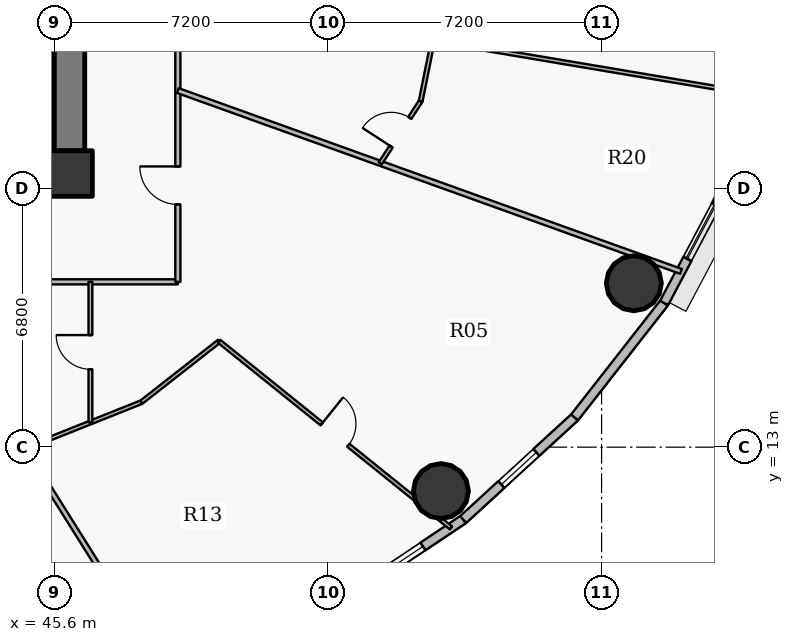
"""IFC4 building model, lengths in metres.
Left out: names, types, materials, properties, quantities, classifications, styles, units other than length and angle.
Written with IfcOpenShell. Run it as: python <this file> out.ifc"""

import sys

from ifc_helpers import new_model, si_unit, direction, frame, frame_2d, origin, origin_2d, place, context, subcontext, project, spatial, rectangle, hollow_circle, extrude, source, transform, mapped, element, fill, save


model = new_model("IFC4")
c1 = context("Model", 3, precision=1e-05, world=origin(), true_north=direction((0.0, 1.0)))
c2 = subcontext(c1, "Body", "Model", "MODEL_VIEW")
j1 = project(units=[si_unit("LENGTHUNIT", "METRE"), si_unit("PLANEANGLEUNIT", "RADIAN")], contexts=[c1])
p1 = place(None, origin())
s1 = spatial("IfcSite", under=j1, at=p1, CompositionType="ELEMENT")
p2 = place(p1, origin())
s2 = spatial("IfcBuilding", under=s1, at=p2, CompositionType="ELEMENT")
p3 = place(p2, frame((0.0, 0.0, 123.45)))
s3 = spatial("IfcBuildingStorey", under=s2, at=p3, CompositionType="ELEMENT", Elevation=123.45)
p4 = place(p3, frame((46.0, 20.2, 0.0), z_axis=(0.0, 0.0, 1.0), x_axis=(1.0, 0.0, 0.0)))
e1 = element("IfcColumn", 1, at=p4, inside=s3, PredefinedType="COLUMN", context=c2, shape_type="SweptSolid", body=[
    extrude(rectangle(XDim=1.2, YDim=1.2, at=origin_2d()), origin(), (0.0, 0.0, 1.0), 3.75),
])
p5 = place(p3, frame((46.0, 33.2, 0.0), z_axis=(0.0, 0.0, 1.0), x_axis=(0.0, -1.0, 0.0)))
e2 = element("IfcWall", 2, at=p5, inside=s3, PredefinedType="SHEAR", context=c2, shape_type="SweptSolid", body=[
    extrude(rectangle(XDim=12.4, YDim=0.8, at=frame_2d((6.2, 0.0))), origin(), (0.0, 0.0, 1.0), 2.95),
])
p6 = place(p5, frame((5.79, 0.0, 0.0)))
e3 = element("IfcOpeningElement", 3, at=p6, cuts=e2, PredefinedType="OPENING", context=c2, shape_type="SweptSolid", body=[
    extrude(rectangle(XDim=0.82, YDim=2.1, at=origin_2d()), frame((0.41, 0.41, 1.05), z_axis=(0.0, -1.0, 0.0), x_axis=(1.0, 0.0, 0.0)), (0.0, 0.0, 1.0), 0.82),
])
for number, where, z_axis, x_axis in (
    (4, (55.773, 11.844, 0.0), (0.0, 0.0, 1.0), (1.0, 0.0, 0.0)),
    (5, (60.849, 17.312, 0.0), (0.0, 0.0, 1.0), (1.0, 0.0, 0.0)),
):
    element("IfcColumn", number, at=place(p3, frame(where, z_axis=z_axis, x_axis=x_axis)), inside=s3, PredefinedType="COLUMN", context=c2, shape_type="SweptSolid", body=[
        extrude(hollow_circle(Radius=0.725, WallThickness=0.042, at=origin_2d()), origin(), (0.0, 0.0, 1.0), 3.75),
    ])
p7 = place(p3, frame((56.358, 11.097, 0.0), z_axis=(0.0, 0.0, 1.0), x_axis=(-0.831221811447, -0.555940914284, 0.0)))
e6 = element("IfcWall", 6, at=p7, inside=s3, PredefinedType="SOLIDWALL", context=c2, shape_type="SweptSolid", body=[
    extrude(rectangle(XDim=4.13, YDim=0.24, at=frame_2d((2.065, 0.0))), origin(), (0.0, 0.0, 1.0), 3.5),
])
p8 = place(p7, frame((1.276, 0.0, 0.9)))
e7 = element("IfcOpeningElement", 7, at=p8, cuts=e6, PredefinedType="OPENING", context=c2, shape_type="SweptSolid", body=[
    extrude(rectangle(XDim=2.0, YDim=1.75, at=origin_2d()), frame((1.0, 0.13, 0.875), z_axis=(0.0, -1.0, 0.0), x_axis=(1.0, 0.0, 0.0)), (0.0, 0.0, 1.0), 0.26),
])
p9 = place(p3, frame((59.289, 13.783, 0.0), z_axis=(0.0, 0.0, 1.0), x_axis=(-0.737113356241, -0.675769117414, 0.0)))
e8 = element("IfcWall", 8, at=p9, inside=s3, PredefinedType="SOLIDWALL", context=c2, shape_type="SweptSolid", body=[
    extrude(rectangle(XDim=3.976, YDim=0.24, at=frame_2d((1.988, 0.0))), origin(), (0.0, 0.0, 1.0), 3.5),
])
p10 = place(p9, frame((1.363, 0.0, 0.9)))
e9 = element("IfcOpeningElement", 9, at=p10, cuts=e8, PredefinedType="OPENING", context=c2, shape_type="SweptSolid", body=[
    extrude(rectangle(XDim=1.25, YDim=1.65, at=origin_2d()), frame((0.625, 0.13, 0.825), z_axis=(0.0, -1.0, 0.0), x_axis=(1.0, 0.0, 0.0)), (0.0, 0.0, 1.0), 0.26),
])
p11 = place(p3, frame((61.645, 16.794, 0.0), z_axis=(0.0, 0.0, 1.0), x_axis=(-0.616272103517, -0.787533297345, 0.0)))
e10 = element("IfcWall", 10, at=p11, inside=s3, PredefinedType="SOLIDWALL", context=c2, shape_type="SweptSolid", body=[
    extrude(rectangle(XDim=3.823, YDim=0.24, at=frame_2d((1.912, 0.0))), origin(), (0.0, 0.0, 1.0), 3.5),
])
p12 = place(p3, frame((63.37, 20.055, 0.0), z_axis=(0.0, 0.0, 1.0), x_axis=(-0.467614004126, -0.883932770716, 0.0)))
e11 = element("IfcWall", 11, at=p12, inside=s3, PredefinedType="SOLIDWALL", context=c2, shape_type="SweptSolid", body=[
    extrude(rectangle(XDim=3.689, YDim=0.24, at=frame_2d((1.844, 0.0))), origin(), (0.0, 0.0, 1.0), 3.5),
])
p13 = place(p12, frame((0.778, 0.0, 0.9)))
e12 = element("IfcOpeningElement", 12, at=p13, cuts=e11, PredefinedType="OPENING", context=c2, shape_type="SweptSolid", body=[
    extrude(rectangle(XDim=1.6, YDim=1.75, at=origin_2d()), frame((0.8, 0.13, 0.875), z_axis=(0.0, -1.0, 0.0), x_axis=(1.0, 0.0, 0.0)), (0.0, 0.0, 1.0), 0.26),
])
p14 = place(p3, frame((35.584, 17.35, 0.0), z_axis=(0.0, 0.0, 1.0), x_axis=(1.0, 0.0, 0.0)))
e13 = element("IfcWall", 13, at=p14, inside=s3, PredefinedType="PARTITIONING", context=c2, shape_type="SweptSolid", body=[
    extrude(rectangle(XDim=13.266, YDim=0.135, at=frame_2d((6.633, 0.0))), origin(), (0.0, 0.0, 1.0), 2.935),
])
p15 = place(p14, frame((2.757, 0.0, 0.0)))
e14 = element("IfcOpeningElement", 14, at=p15, cuts=e13, PredefinedType="OPENING", context=c2, shape_type="SweptSolid", body=[
    extrude(rectangle(XDim=1.0, YDim=2.15, at=origin_2d()), frame((0.5, 0.078, 1.075), z_axis=(0.0, -1.0, 0.0), x_axis=(1.0, 0.0, 0.0)), (0.0, 0.0, 1.0), 0.155),
])
p16 = place(p3, frame((42.058, 17.35, 0.0), z_axis=(0.0, 0.0, 1.0), x_axis=(0.531660079213, -0.846957826678, 0.0)))
e15 = element("IfcWall", 15, at=p16, inside=s3, PredefinedType="PARTITIONING", context=c2, shape_type="SweptSolid", body=[
    extrude(rectangle(XDim=12.437, YDim=0.135, at=frame_2d((6.219, 0.0))), origin(), (0.0, 0.0, 1.0), 2.935),
])
p17 = place(p3, frame((42.251, 11.934, 0.0), z_axis=(0.0, 0.0, 1.0), x_axis=(0.928803554156, 0.370572473055, 0.0)))
e16 = element("IfcWall", 16, at=p17, inside=s3, PredefinedType="PARTITIONING", context=c2, shape_type="SweptSolid", body=[
    extrude(rectangle(XDim=6.072, YDim=0.1, at=frame_2d((3.036, 0.0))), origin(), (0.0, 0.0, 1.0), 2.935),
])
p18 = place(p3, frame((46.549, 13.649, 0.0), z_axis=(0.0, 0.0, 1.0), x_axis=(0.0, 1.0, 0.0)))
e17 = element("IfcWall", 17, at=p18, inside=s3, PredefinedType="PARTITIONING", context=c2, shape_type="SweptSolid", body=[
    extrude(rectangle(XDim=3.701, YDim=0.1, at=frame_2d((1.851, 0.0))), origin(), (0.0, 0.0, 1.0), 3.5),
])
p19 = place(p18, frame((1.4, 0.0, 0.0)))
e18 = element("IfcOpeningElement", 18, at=p19, cuts=e17, PredefinedType="OPENING", context=c2, shape_type="SweptSolid", body=[
    extrude(rectangle(XDim=0.9, YDim=2.1, at=origin_2d()), frame((0.45, 0.06, 1.05), z_axis=(0.0, -1.0, 0.0), x_axis=(1.0, 0.0, 0.0)), (0.0, 0.0, 1.0), 0.12),
])
p20 = place(p3, frame((47.891, 14.184, 0.0), z_axis=(0.0, 0.0, 1.0), x_axis=(0.787364158956, 0.616488184146, 0.0)))
e19 = element("IfcWall", 19, at=p20, inside=s3, PredefinedType="PARTITIONING", context=c2, shape_type="SweptSolid", body=[
    extrude(rectangle(XDim=2.597, YDim=0.1, at=frame_2d((1.299, 0.0))), origin(), (0.0, 0.0, 1.0), 3.5),
])
p21 = place(p3, frame((48.85, 17.35, 0.0), z_axis=(0.0, 0.0, 1.0), x_axis=(0.0, 1.0, 0.0)))
e20 = element("IfcWall", 20, at=p21, inside=s3, PredefinedType="PARTITIONING", context=c2, shape_type="SweptSolid", body=[
    extrude(rectangle(XDim=19.3, YDim=0.135, at=frame_2d((9.65, 0.0))), origin(), (0.0, 0.0, 1.0), 2.935),
])
p22 = place(p21, frame((2.036, 0.0, 0.0)))
e21 = element("IfcOpeningElement", 21, at=p22, cuts=e20, PredefinedType="OPENING", context=c2, shape_type="SweptSolid", body=[
    extrude(rectangle(XDim=1.0, YDim=2.15, at=origin_2d()), frame((0.5, 0.078, 1.075), z_axis=(0.0, -1.0, 0.0), x_axis=(1.0, 0.0, 0.0)), (0.0, 0.0, 1.0), 0.155),
])
p23 = place(p21, frame((10.875, 0.0, 0.0)))
e22 = element("IfcOpeningElement", 22, at=p23, cuts=e20, PredefinedType="OPENING", context=c2, shape_type="SweptSolid", body=[
    extrude(rectangle(XDim=1.0, YDim=2.15, at=origin_2d()), frame((0.5, 0.078, 1.075), z_axis=(0.0, -1.0, 0.0), x_axis=(1.0, 0.0, 0.0)), (0.0, 0.0, 1.0), 0.155),
])
p24 = place(p3, frame((48.85, 22.383, 0.0), z_axis=(0.0, 0.0, 1.0), x_axis=(0.941089213164, -0.338158384292, 0.0)))
e23 = element("IfcWall", 23, at=p24, inside=s3, PredefinedType="PARTITIONING", context=c2, shape_type="SweptSolid", body=[
    extrude(rectangle(XDim=14.069, YDim=0.135, at=frame_2d((7.035, 0.0))), origin(), (0.0, 0.0, 1.0), 2.935),
])
p25 = place(p3, frame((49.936, 15.786, 0.0), z_axis=(0.0, 0.0, 1.0), x_axis=(0.779083359145, -0.626920345421, 0.0)))
e24 = element("IfcWall", 24, at=p25, inside=s3, PredefinedType="PARTITIONING", context=c2, shape_type="SweptSolid", body=[
    extrude(rectangle(XDim=7.831, YDim=0.1, at=frame_2d((3.916, 0.0))), origin(), (0.0, 0.0, 1.0), 2.935),
])
p26 = place(p25, frame((3.466, 0.0, 0.0)))
e25 = element("IfcOpeningElement", 25, at=p26, cuts=e24, PredefinedType="OPENING", context=c2, shape_type="SweptSolid", body=[
    extrude(rectangle(XDim=0.9, YDim=2.1, at=origin_2d()), frame((0.45, 0.06, 1.05), z_axis=(0.0, -1.0, 0.0), x_axis=(1.0, 0.0, 0.0)), (0.0, 0.0, 1.0), 0.12),
])
p27 = place(p3, frame((54.176, 20.469, 0.0), z_axis=(0.0, 0.0, 1.0), x_axis=(0.545370803514, 0.838194897786, 0.0)))
e26 = element("IfcWall", 26, at=p27, inside=s3, PredefinedType="PARTITIONING", context=c2, shape_type="SweptSolid", body=[
    extrude(rectangle(XDim=1.952, YDim=0.1, at=frame_2d((0.976, 0.0))), origin(), (0.0, 0.0, 1.0), 3.5),
])
p28 = place(p27, frame((0.526, 0.0, 0.0)))
e27 = element("IfcOpeningElement", 27, at=p28, cuts=e26, PredefinedType="OPENING", context=c2, shape_type="SweptSolid", body=[
    extrude(rectangle(XDim=0.9, YDim=2.1, at=origin_2d()), frame((0.45, 0.06, 1.05), z_axis=(0.0, -1.0, 0.0), x_axis=(1.0, 0.0, 0.0)), (0.0, 0.0, 1.0), 0.12),
])
p29 = place(p3, frame((55.24, 22.105, 0.0), z_axis=(0.0, 0.0, 1.0), x_axis=(0.198205355444, 0.980160515973, 0.0)))
e28 = element("IfcWall", 28, at=p29, inside=s3, PredefinedType="PARTITIONING", context=c2, shape_type="SweptSolid", body=[
    extrude(rectangle(XDim=4.112, YDim=0.1, at=frame_2d((2.056, 0.0))), origin(), (0.0, 0.0, 1.0), 3.5),
])
p30 = place(p3, frame((55.564, 23.708, 0.0), z_axis=(0.0, 0.0, 1.0), x_axis=(0.986139151265, -0.165920385556, 0.0)))
e29 = element("IfcWall", 29, at=p30, inside=s3, PredefinedType="PARTITIONING", context=c2, shape_type="SweptSolid", body=[
    extrude(rectangle(XDim=8.612, YDim=0.1, at=frame_2d((4.306, 0.0))), origin(), (0.0, 0.0, 1.0), 2.935),
])
p31 = place(p3, frame((45.41, 19.8, 0.0), z_axis=(0.0, 0.0, 1.0), x_axis=(1.0, 0.0, 0.0)))
e30 = element("IfcWall", 30, at=p31, inside=s3, PredefinedType="PARTITIONING", context=c2, shape_type="SweptSolid", body=[
    extrude(rectangle(XDim=0.99, YDim=0.135, at=frame_2d((0.495, 0.0))), origin(), (0.0, 0.0, 1.0), 2.935),
])
p32 = place(p3, frame((46.4, 20.107, 0.0), z_axis=(0.0, 0.0, 1.0), x_axis=(0.0, 1.0, 0.0)))
e31 = element("IfcWall", 31, at=p32, inside=s3, PredefinedType="PARTITIONING", context=c2, shape_type="SweptSolid", body=[
    extrude(rectangle(XDim=0.683, YDim=0.135, at=frame_2d((0.341, 0.0))), origin(), (0.0, 0.0, 1.0), 3.5),
])
m1 = source(origin(), c2, "Body", "SweptSolid", [
    extrude(rectangle(XDim=2.0, YDim=1.75, at=origin_2d()), frame((1.0, 0.03, 0.875), z_axis=(0.0, -1.0, 0.0), x_axis=(1.0, 0.0, 0.0)), (0.0, 0.0, 1.0), 0.06),
])
p33 = place(p8, origin())
e32 = element("IfcWindow", 32, at=p33, inside=s3, PartitioningType="DOUBLE_PANEL_VERTICAL", PredefinedType="WINDOW", context=c2, shape_type="MappedRepresentation", body=[
    mapped(m1, transform((0.0, 0.0, 0.0), x_axis=(1.0, 0.0, 0.0), y_axis=(0.0, 1.0, 0.0), z_axis=(0.0, 0.0, 1.0), scale=1.0)),
])
fill(e7, e32)
m2 = source(origin(), c2, "Body", "SweptSolid", [
    extrude(rectangle(XDim=1.6, YDim=1.75, at=origin_2d()), frame((0.8, 0.03, 0.875), z_axis=(0.0, -1.0, 0.0), x_axis=(1.0, 0.0, 0.0)), (0.0, 0.0, 1.0), 0.06),
])
p34 = place(p13, origin())
e33 = element("IfcWindow", 33, at=p34, inside=s3, PartitioningType="DOUBLE_PANEL_VERTICAL", PredefinedType="WINDOW", context=c2, shape_type="MappedRepresentation", body=[
    mapped(m2, transform((0.0, 0.0, 0.0), x_axis=(1.0, 0.0, 0.0), y_axis=(0.0, 1.0, 0.0), z_axis=(0.0, 0.0, 1.0), scale=1.0)),
])
fill(e12, e33)
m3 = source(origin(), c2, "Body", "SweptSolid", [
    extrude(rectangle(XDim=1.25, YDim=1.65, at=origin_2d()), frame((0.625, 0.03, 0.825), z_axis=(0.0, -1.0, 0.0), x_axis=(1.0, 0.0, 0.0)), (0.0, 0.0, 1.0), 0.06),
])
p35 = place(p10, origin())
e34 = element("IfcWindow", 34, at=p35, inside=s3, PartitioningType="SINGLE_PANEL", PredefinedType="WINDOW", context=c2, shape_type="MappedRepresentation", body=[
    mapped(m3, transform((0.0, 0.0, 0.0), x_axis=(1.0, 0.0, 0.0), y_axis=(0.0, 1.0, 0.0), z_axis=(0.0, 0.0, 1.0), scale=1.0)),
])
fill(e9, e34)
m4 = source(origin(), c2, "Body", "SweptSolid", [
    extrude(rectangle(XDim=1.0, YDim=2.15, at=origin_2d()), frame((0.5, 0.025, 1.075), z_axis=(0.0, -1.0, 0.0), x_axis=(1.0, 0.0, 0.0)), (0.0, 0.0, 1.0), 0.05),
])
p36 = place(p22, origin())
e35 = element("IfcDoor", 35, at=p36, inside=s3, OperationType="SINGLE_SWING_RIGHT", PredefinedType="DOOR", context=c2, shape_type="MappedRepresentation", body=[
    mapped(m4, transform((0.0, 0.0, 0.0), x_axis=(1.0, 0.0, 0.0), y_axis=(0.0, 1.0, 0.0), z_axis=(0.0, 0.0, 1.0), scale=1.0)),
])
fill(e21, e35)
m5 = source(origin(), c2, "Body", "SweptSolid", [
    extrude(rectangle(XDim=0.9, YDim=2.1, at=origin_2d()), frame((0.45, 0.025, 1.05), z_axis=(0.0, -1.0, 0.0), x_axis=(1.0, 0.0, 0.0)), (0.0, 0.0, 1.0), 0.05),
])
p37 = place(p26, origin())
e36 = element("IfcDoor", 36, at=p37, inside=s3, OperationType="SINGLE_SWING_LEFT", PredefinedType="DOOR", context=c2, shape_type="MappedRepresentation", body=[
    mapped(m5, transform((0.0, 0.0, 0.0), x_axis=(1.0, 0.0, 0.0), y_axis=(0.0, 1.0, 0.0), z_axis=(0.0, 0.0, 1.0), scale=1.0)),
])
fill(e25, e36)
p38 = place(p19, origin())
e37 = element("IfcDoor", 37, at=p38, inside=s3, OperationType="SINGLE_SWING_RIGHT", PredefinedType="DOOR", context=c2, shape_type="MappedRepresentation", body=[
    mapped(m5, transform((0.0, 0.0, 0.0), x_axis=(1.0, 0.0, 0.0), y_axis=(0.0, 1.0, 0.0), z_axis=(0.0, 0.0, 1.0), scale=1.0)),
])
fill(e18, e37)
p39 = place(p28, origin())
e38 = element("IfcDoor", 38, at=p39, inside=s3, OperationType="SINGLE_SWING_LEFT", PredefinedType="DOOR", context=c2, shape_type="MappedRepresentation", body=[
    mapped(m5, transform((0.0, 0.0, 0.0), x_axis=(1.0, 0.0, 0.0), y_axis=(0.0, 1.0, 0.0), z_axis=(0.0, 0.0, 1.0), scale=1.0)),
])
fill(e27, e38)
save(model, sys.argv[1])
